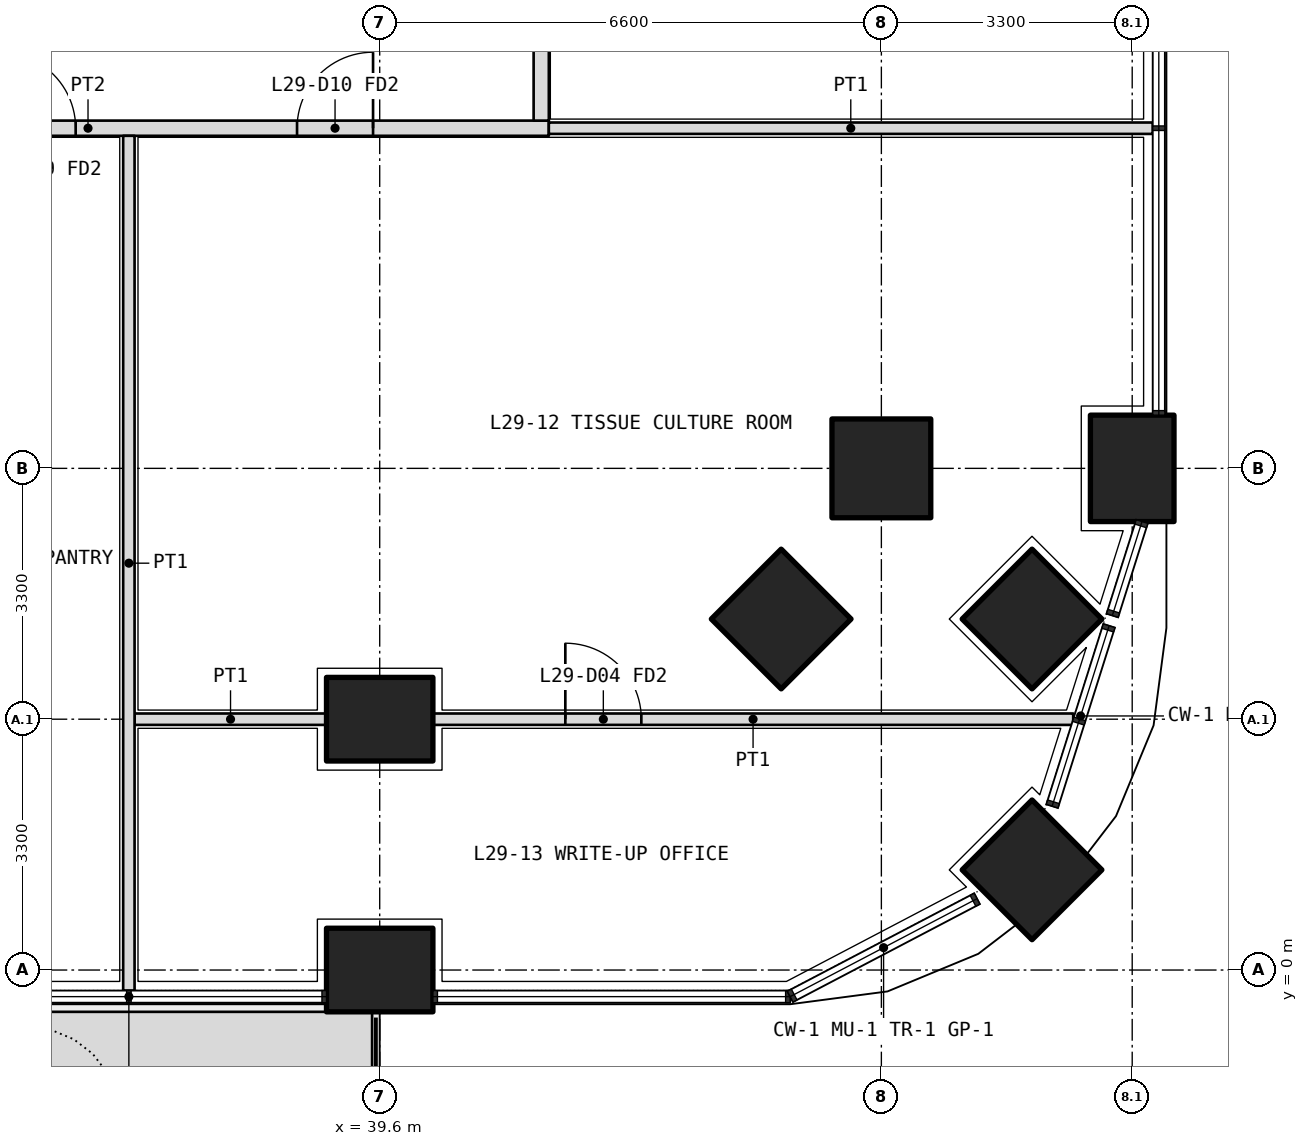
"""IFC4 building model, lengths in metres.
Left out: names, types, materials, properties, quantities, classifications, styles, units other than length and angle.
Written with IfcOpenShell. Run it as: python <this file> out.ifc"""

import sys

from ifc_helpers import new_model, si_unit, direction, frame, frame_2d, origin, origin_2d, place, context, subcontext, project, spatial, polyline, rectangle, outline, extrude, element, fill, save


model = new_model("IFC4")
c1 = context("Model", 3, precision=1e-05, world=origin(), true_north=direction((0.0, 1.0)))
c2 = subcontext(c1, "Body", "Model", "MODEL_VIEW")
j1 = project(units=[si_unit("LENGTHUNIT", "METRE"), si_unit("PLANEANGLEUNIT", "RADIAN")], contexts=[c1])
p1 = place(None, origin())
s1 = spatial("IfcSite", under=j1, at=p1, CompositionType="ELEMENT")
p2 = place(p1, origin())
s2 = spatial("IfcBuilding", under=s1, at=p2, CompositionType="ELEMENT")
p3 = place(p2, frame((0.0, 0.0, 128.4)))
s3 = spatial("IfcBuildingStorey", under=s2, at=p3, CompositionType="ELEMENT", Elevation=128.4)
p4 = place(p3, frame((48.182, 1.318, 0.0), z_axis=(0.0, 0.0, 1.0), x_axis=(0.707106781187, 0.707106781187, 0.0)))
e1 = element("IfcColumn", 1, at=p4, inside=s3, PredefinedType="COLUMN", context=c2, shape_type="SweptSolid", body=[
    extrude(rectangle(XDim=1.3, YDim=1.3, at=origin_2d()), origin(), (0.0, 0.0, 1.0), 4.2),
])
for number, where, z_axis, x_axis in (
    (2, (39.6, 0.0, 0.0), (0.0, 0.0, 1.0), (1.0, 0.0, 0.0)),
    (3, (49.5, 6.6, 0.0), (0.0, 0.0, 1.0), (0.0, 1.0, 0.0)),
):
    element("IfcColumn", number, at=place(p3, frame(where, z_axis=z_axis, x_axis=x_axis)), inside=s3, PredefinedType="COLUMN", context=c2, shape_type="SweptSolid", body=[
        extrude(rectangle(XDim=1.4, YDim=1.1, at=origin_2d()), origin(), (0.0, 0.0, 1.0), 4.2),
    ])
for number, where, z_axis, x_axis in (
    (4, (46.2, 6.6, 0.0), (0.0, 0.0, 1.0), (1.0, 0.0, 0.0)),
    (5, (48.182, 4.618, 0.0), (0.0, 0.0, 1.0), (0.707, 0.707, 0.0)),
):
    element("IfcColumn", number, at=place(p3, frame(where, z_axis=z_axis, x_axis=x_axis)), inside=s3, PredefinedType="COLUMN", context=c2, shape_type="SweptSolid", body=[
        extrude(rectangle(XDim=1.3, YDim=1.3, at=origin_2d()), origin(), (0.0, 0.0, 1.0), 4.2),
    ])
p5 = place(p3, frame((39.6, 3.3, 0.0), z_axis=(0.0, 0.0, 1.0), x_axis=(1.0, 0.0, 0.0)))
e6 = element("IfcColumn", 6, at=p5, inside=s3, PredefinedType="COLUMN", context=c2, shape_type="SweptSolid", body=[
    extrude(rectangle(XDim=1.4, YDim=1.1, at=origin_2d()), origin(), (0.0, 0.0, 1.0), 4.2),
])
p6 = place(p3, frame((44.882, 4.618, 0.0), z_axis=(0.0, 0.0, 1.0), x_axis=(0.707106781187, 0.707106781187, 0.0)))
e7 = element("IfcColumn", 7, at=p6, inside=s3, PredefinedType="COLUMN", context=c2, shape_type="SweptSolid", body=[
    extrude(rectangle(XDim=1.3, YDim=1.3, at=origin_2d()), origin(), (0.0, 0.0, 1.0), 4.2),
])
p7 = place(p3, origin())
e8 = element("IfcWall", 8, at=p7, inside=s3, PredefinedType="USERDEFINED", context=c2, shape_type="SweptSolid", body=[
    extrude(outline(polyline([(30.45, -1.55), (39.5, -1.55), (39.5, -0.55), (30.45, -0.55), (30.45, -1.55)]), holes=[polyline([(30.6, -1.4), (39.35, -1.4), (39.35, -0.7), (30.6, -0.7), (30.6, -1.4)])]), origin(), (0.0, 0.0, 1.0), 1.05),
])
p8 = place(p3, frame((29.7, 11.075, 0.0), z_axis=(0.0, 0.0, 1.0), x_axis=(1.0, 0.0, 0.0)))
e9 = element("IfcWall", 9, at=p8, inside=s3, PredefinedType="PARTITIONING", context=c2, shape_type="SweptSolid", body=[
    extrude(rectangle(XDim=12.125, YDim=0.2, at=frame_2d((6.062, 0.0))), origin(), (0.0, 0.0, 1.0), 2.85),
])
p9 = place(p8, frame((1.6, 0.0, 0.0)))
e10 = element("IfcOpeningElement", 10, at=p9, cuts=e9, PredefinedType="OPENING", context=c2, shape_type="SweptSolid", body=[
    extrude(rectangle(XDim=1.0, YDim=2.1, at=frame_2d((0.5, 1.05))), frame((0.0, 0.11, 0.0), z_axis=(0.0, -1.0, 0.0), x_axis=(1.0, 0.0, 0.0)), (0.0, 0.0, 1.0), 0.22),
])
p10 = place(p8, frame((4.9, 0.0, 0.0)))
e11 = element("IfcOpeningElement", 11, at=p10, cuts=e9, PredefinedType="OPENING", context=c2, shape_type="SweptSolid", body=[
    extrude(rectangle(XDim=1.0, YDim=2.1, at=frame_2d((0.5, 1.05))), frame((0.0, 0.11, 0.0), z_axis=(0.0, -1.0, 0.0), x_axis=(1.0, 0.0, 0.0)), (0.0, 0.0, 1.0), 0.22),
])
p11 = place(p8, frame((8.812, 0.0, 0.0)))
e12 = element("IfcOpeningElement", 12, at=p11, cuts=e9, PredefinedType="OPENING", context=c2, shape_type="SweptSolid", body=[
    extrude(rectangle(XDim=1.0, YDim=2.1, at=frame_2d((0.5, 1.05))), frame((0.0, 0.11, 0.0), z_axis=(0.0, -1.0, 0.0), x_axis=(1.0, 0.0, 0.0)), (0.0, 0.0, 1.0), 0.22),
])
p12 = place(p3, frame((41.725, 11.175, 0.0), z_axis=(0.0, 0.0, 1.0), x_axis=(0.0, 1.0, 0.0)))
e13 = element("IfcWall", 13, at=p12, inside=s3, PredefinedType="PARTITIONING", context=c2, shape_type="SweptSolid", body=[
    extrude(rectangle(XDim=27.625, YDim=0.2, at=frame_2d((13.812, 0.0))), origin(), (0.0, 0.0, 1.0), 2.85),
])
p13 = place(p12, frame((3.762, 0.0, 0.0)))
e14 = element("IfcOpeningElement", 14, at=p13, cuts=e13, PredefinedType="OPENING", context=c2, shape_type="SweptSolid", body=[
    extrude(rectangle(XDim=1.0, YDim=2.1, at=frame_2d((0.5, 1.05))), frame((0.0, 0.11, 0.0), z_axis=(0.0, -1.0, 0.0), x_axis=(1.0, 0.0, 0.0)), (0.0, 0.0, 1.0), 0.22),
])
p14 = place(p12, frame((9.725, 0.0, 0.0)))
e15 = element("IfcOpeningElement", 15, at=p14, cuts=e13, PredefinedType="OPENING", context=c2, shape_type="SweptSolid", body=[
    extrude(rectangle(XDim=1.0, YDim=2.1, at=frame_2d((0.5, 1.05))), frame((0.0, 0.11, 0.0), z_axis=(0.0, -1.0, 0.0), x_axis=(1.0, 0.0, 0.0)), (0.0, 0.0, 1.0), 0.22),
])
p15 = place(p12, frame((13.075, 0.0, 0.0)))
e16 = element("IfcOpeningElement", 16, at=p15, cuts=e13, PredefinedType="OPENING", context=c2, shape_type="SweptSolid", body=[
    extrude(rectangle(XDim=0.9, YDim=2.1, at=frame_2d((0.45, 1.05))), frame((0.0, 0.11, 0.0), z_axis=(0.0, -1.0, 0.0), x_axis=(1.0, 0.0, 0.0)), (0.0, 0.0, 1.0), 0.22),
])
p16 = place(p12, frame((19.675, 0.0, 0.0)))
e17 = element("IfcOpeningElement", 17, at=p16, cuts=e13, PredefinedType="OPENING", context=c2, shape_type="SweptSolid", body=[
    extrude(rectangle(XDim=1.0, YDim=2.1, at=frame_2d((0.5, 1.05))), frame((0.0, 0.11, 0.0), z_axis=(0.0, -1.0, 0.0), x_axis=(1.0, 0.0, 0.0)), (0.0, 0.0, 1.0), 0.22),
])
p17 = place(p12, frame((25.925, 0.0, 0.0)))
e18 = element("IfcOpeningElement", 18, at=p17, cuts=e13, PredefinedType="OPENING", context=c2, shape_type="SweptSolid", body=[
    extrude(rectangle(XDim=1.0, YDim=2.1, at=frame_2d((0.5, 1.05))), frame((0.0, 0.11, 0.0), z_axis=(0.0, -1.0, 0.0), x_axis=(1.0, 0.0, 0.0)), (0.0, 0.0, 1.0), 0.22),
])
p18 = place(p3, frame((49.77, 11.075, 0.0), z_axis=(0.0, 0.0, 1.0), x_axis=(-1.0, 0.0, 0.0)))
e19 = element("IfcWall", 19, at=p18, inside=s3, PredefinedType="PARTITIONING", context=c2, shape_type="SweptSolid", body=[
    extrude(rectangle(XDim=7.945, YDim=0.15, at=frame_2d((3.973, 0.0))), origin(), (0.0, 0.0, 1.0), 2.7),
])
p19 = place(p3, frame((36.375, 3.3, 0.0), z_axis=(0.0, 0.0, 1.0), x_axis=(1.0, 0.0, 0.0)))
e20 = element("IfcWall", 20, at=p19, inside=s3, PredefinedType="PARTITIONING", context=c2, shape_type="SweptSolid", body=[
    extrude(rectangle(XDim=2.525, YDim=0.15, at=frame_2d((1.262, 0.0))), origin(), (0.0, 0.0, 1.0), 2.85),
])
p20 = place(p3, frame((40.3, 3.3, 0.0), z_axis=(0.0, 0.0, 1.0), x_axis=(1.0, 0.0, 0.0)))
e21 = element("IfcWall", 21, at=p20, inside=s3, PredefinedType="PARTITIONING", context=c2, shape_type="SweptSolid", body=[
    extrude(rectangle(XDim=8.424, YDim=0.15, at=frame_2d((4.212, 0.0))), origin(), (0.0, 0.0, 1.0), 2.7),
])
p21 = place(p20, frame((1.742, 0.0, 0.0)))
e22 = element("IfcOpeningElement", 22, at=p21, cuts=e21, PredefinedType="OPENING", context=c2, shape_type="SweptSolid", body=[
    extrude(rectangle(XDim=1.0, YDim=2.1, at=frame_2d((0.5, 1.05))), frame((0.0, 0.085, 0.0), z_axis=(0.0, -1.0, 0.0), x_axis=(1.0, 0.0, 0.0)), (0.0, 0.0, 1.0), 0.17),
])
p22 = place(p3, frame((36.3, -0.27, 0.0), z_axis=(0.0, 0.0, 1.0), x_axis=(0.0, 1.0, 0.0)))
e23 = element("IfcWall", 23, at=p22, inside=s3, PredefinedType="PARTITIONING", context=c2, shape_type="SweptSolid", body=[
    extrude(rectangle(XDim=11.245, YDim=0.15, at=frame_2d((5.623, 0.0))), origin(), (0.0, 0.0, 1.0), 2.7),
])
p23 = place(p10, origin())
e24 = element("IfcDoor", 24, at=p23, inside=s3, OperationType="SINGLE_SWING_LEFT", PredefinedType="DOOR", context=c2, shape_type="SweptSolid", body=[
    extrude(rectangle(XDim=1.0, YDim=2.1, at=frame_2d((0.5, 1.05))), frame((0.0, 0.025, 0.0), z_axis=(0.0, -1.0, 0.0), x_axis=(1.0, 0.0, 0.0)), (0.0, 0.0, 1.0), 0.05),
])
fill(e11, e24)
p24 = place(p11, origin())
e25 = element("IfcDoor", 25, at=p24, inside=s3, OperationType="SINGLE_SWING_RIGHT", PredefinedType="DOOR", context=c2, shape_type="SweptSolid", body=[
    extrude(rectangle(XDim=1.0, YDim=2.1, at=frame_2d((0.5, 1.05))), frame((0.0, 0.025, 0.0), z_axis=(0.0, -1.0, 0.0), x_axis=(1.0, 0.0, 0.0)), (0.0, 0.0, 1.0), 0.05),
])
fill(e12, e25)
p25 = place(p21, origin())
e26 = element("IfcDoor", 26, at=p25, inside=s3, OperationType="SINGLE_SWING_LEFT", PredefinedType="DOOR", context=c2, shape_type="SweptSolid", body=[
    extrude(rectangle(XDim=1.0, YDim=2.1, at=frame_2d((0.5, 1.05))), frame((0.0, 0.025, 0.0), z_axis=(0.0, -1.0, 0.0), x_axis=(1.0, 0.0, 0.0)), (0.0, 0.0, 1.0), 0.05),
])
fill(e22, e26)
save(model, sys.argv[1])
